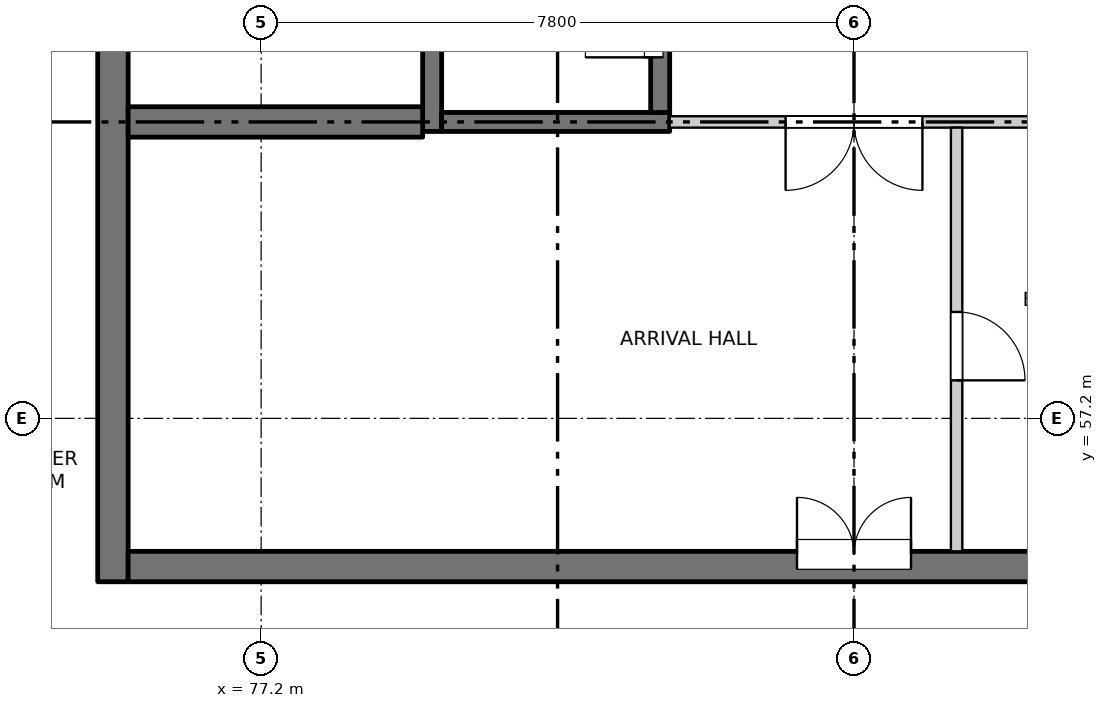
"""IFC4 building model, lengths in metres.
Left out: names, types, materials, properties, quantities, classifications, styles, units other than length and angle.
Written with IfcOpenShell. Run it as: python <this file> out.ifc"""

import sys

from ifc_helpers import new_model, si_unit, direction, frame, frame_2d, origin, place, context, subcontext, project, spatial, rectangle, extrude, element, fill, save


model = new_model("IFC4")
c1 = context("Model", 3, precision=1e-05, world=origin(), true_north=direction((0.0, 1.0)))
c2 = subcontext(c1, "Body", "Model", "MODEL_VIEW")
j1 = project(units=[si_unit("LENGTHUNIT", "METRE"), si_unit("PLANEANGLEUNIT", "RADIAN")], contexts=[c1])
p1 = place(None, origin())
s1 = spatial("IfcSite", under=j1, at=p1, CompositionType="ELEMENT")
p2 = place(p1, origin())
s2 = spatial("IfcBuilding", under=s1, at=p2, CompositionType="ELEMENT")
p3 = place(p2, frame((0.0, 0.0, 259.6)))
s3 = spatial("IfcBuildingStorey", under=s2, at=p3, CompositionType="ELEMENT", Elevation=259.6)
p4 = place(p3, frame((75.25, 55.05, -0.25), z_axis=(0.0, 0.0, 1.0), x_axis=(0.0, 1.0, 0.0)))
e1 = element("IfcWall", 1, at=p4, inside=s3, PredefinedType="SOLIDWALL", context=c2, shape_type="SweptSolid", body=[
    extrude(rectangle(XDim=22.25, YDim=0.4, at=frame_2d((11.125, 0.0))), origin(), (0.0, 0.0, 1.0), 3.4),
])
p5 = place(p4, frame((7.4, 0.0, 0.25)))
e2 = element("IfcOpeningElement", 2, at=p5, cuts=e1, PredefinedType="OPENING", context=c2, shape_type="SweptSolid", body=[
    extrude(rectangle(XDim=0.9, YDim=2.1, at=frame_2d((0.45, 1.05))), frame((0.0, 0.21, 0.0), z_axis=(0.0, -1.0, 0.0), x_axis=(1.0, 0.0, 0.0)), (0.0, 0.0, 1.0), 0.42),
])
p6 = place(p4, frame((10.7, 0.0, 0.25)))
e3 = element("IfcOpeningElement", 3, at=p6, cuts=e1, PredefinedType="OPENING", context=c2, shape_type="SweptSolid", body=[
    extrude(rectangle(XDim=0.9, YDim=2.1, at=frame_2d((0.45, 1.05))), frame((0.0, 0.21, 0.0), z_axis=(0.0, -1.0, 0.0), x_axis=(1.0, 0.0, 0.0)), (0.0, 0.0, 1.0), 0.42),
])
p7 = place(p4, frame((15.2, 0.0, 0.25)))
e4 = element("IfcOpeningElement", 4, at=p7, cuts=e1, PredefinedType="OPENING", context=c2, shape_type="SweptSolid", body=[
    extrude(rectangle(XDim=0.9, YDim=2.1, at=frame_2d((0.45, 1.05))), frame((0.0, 0.21, 0.0), z_axis=(0.0, -1.0, 0.0), x_axis=(1.0, 0.0, 0.0)), (0.0, 0.0, 1.0), 0.42),
])
p8 = place(p4, frame((20.0, 0.0, 0.25)))
e5 = element("IfcOpeningElement", 5, at=p8, cuts=e1, PredefinedType="OPENING", context=c2, shape_type="SweptSolid", body=[
    extrude(rectangle(XDim=0.9, YDim=2.1, at=frame_2d((0.45, 1.05))), frame((0.0, 0.21, 0.0), z_axis=(0.0, -1.0, 0.0), x_axis=(1.0, 0.0, 0.0)), (0.0, 0.0, 1.0), 0.42),
])
p9 = place(p3, frame((75.45, 55.25, -0.25), z_axis=(0.0, 0.0, 1.0), x_axis=(1.0, 0.0, 0.0)))
e6 = element("IfcWall", 6, at=p9, inside=s3, PredefinedType="SOLIDWALL", context=c2, shape_type="SweptSolid", body=[
    extrude(rectangle(XDim=19.1, YDim=0.4, at=frame_2d((9.55, 0.0))), origin(), (0.0, 0.0, 1.0), 3.4),
])
p10 = place(p9, frame((8.8, 0.0, 0.25)))
e7 = element("IfcOpeningElement", 7, at=p10, cuts=e6, PredefinedType="OPENING", context=c2, shape_type="SweptSolid", body=[
    extrude(rectangle(XDim=1.5, YDim=2.1, at=frame_2d((0.75, 1.05))), frame((0.0, 0.21, 0.0), z_axis=(0.0, -1.0, 0.0), x_axis=(1.0, 0.0, 0.0)), (0.0, 0.0, 1.0), 0.42),
])
p11 = place(p3, frame((79.45, 60.975, -0.25), z_axis=(0.0, 0.0, 1.0), x_axis=(0.0, 1.0, 0.0)))
e8 = element("IfcWall", 8, at=p11, inside=s3, PredefinedType="SOLIDWALL", context=c2, shape_type="SweptSolid", body=[
    extrude(rectangle(XDim=16.325, YDim=0.25, at=frame_2d((8.163, 0.0))), origin(), (0.0, 0.0, 1.0), 3.4),
])
p12 = place(p3, frame((79.575, 61.1, -0.25), z_axis=(0.0, 0.0, 1.0), x_axis=(1.0, 0.0, 0.0)))
e9 = element("IfcWall", 9, at=p12, inside=s3, PredefinedType="SOLIDWALL", context=c2, shape_type="SweptSolid", body=[
    extrude(rectangle(XDim=3.0, YDim=0.25, at=frame_2d((1.5, 0.0))), origin(), (0.0, 0.0, 1.0), 3.4),
])
p13 = place(p3, frame((82.45, 61.225, -0.25), z_axis=(0.0, 0.0, 1.0), x_axis=(0.0, 1.0, 0.0)))
e10 = element("IfcWall", 10, at=p13, inside=s3, PredefinedType="SOLIDWALL", context=c2, shape_type="SweptSolid", body=[
    extrude(rectangle(XDim=2.35, YDim=0.25, at=frame_2d((1.175, 0.0))), origin(), (0.0, 0.0, 1.0), 3.4),
])
p14 = place(p13, frame((0.725, 0.0, 0.25)))
e11 = element("IfcOpeningElement", 11, at=p14, cuts=e10, PredefinedType="OPENING", context=c2, shape_type="SweptSolid", body=[
    extrude(rectangle(XDim=0.9, YDim=2.1, at=frame_2d((0.45, 1.05))), frame((0.0, 0.135, 0.0), z_axis=(0.0, -1.0, 0.0), x_axis=(1.0, 0.0, 0.0)), (0.0, 0.0, 1.0), 0.27),
])
p15 = place(p3, frame((75.45, 61.1, -0.25), z_axis=(0.0, 0.0, 1.0), x_axis=(1.0, 0.0, 0.0)))
e12 = element("IfcWall", 12, at=p15, inside=s3, PredefinedType="SOLIDWALL", context=c2, shape_type="SweptSolid", body=[
    extrude(rectangle(XDim=3.875, YDim=0.4, at=frame_2d((1.938, 0.0))), origin(), (0.0, 0.0, 1.0), 3.4),
])
p16 = place(p3, frame((82.575, 61.1, 0.0), z_axis=(0.0, 0.0, 1.0), x_axis=(1.0, 0.0, 0.0)))
e13 = element("IfcWall", 13, at=p16, inside=s3, PredefinedType="PARTITIONING", context=c2, shape_type="SweptSolid", body=[
    extrude(rectangle(XDim=4.85, YDim=0.15, at=frame_2d((2.425, 0.0))), origin(), (0.0, 0.0, 1.0), 3.15),
])
p17 = place(p16, frame((1.525, 0.0, 0.0)))
e14 = element("IfcOpeningElement", 14, at=p17, cuts=e13, PredefinedType="OPENING", context=c2, shape_type="SweptSolid", body=[
    extrude(rectangle(XDim=1.8, YDim=2.1, at=frame_2d((0.9, 1.05))), frame((0.0, 0.085, 0.0), z_axis=(0.0, -1.0, 0.0), x_axis=(1.0, 0.0, 0.0)), (0.0, 0.0, 1.0), 0.17),
])
p18 = place(p3, frame((86.35, 55.45, 0.0), z_axis=(0.0, 0.0, 1.0), x_axis=(0.0, 1.0, 0.0)))
e15 = element("IfcWall", 15, at=p18, inside=s3, PredefinedType="PARTITIONING", context=c2, shape_type="SweptSolid", body=[
    extrude(rectangle(XDim=5.575, YDim=0.15, at=frame_2d((2.788, 0.0))), origin(), (0.0, 0.0, 1.0), 3.15),
])
p19 = place(p18, frame((2.25, 0.0, 0.0)))
e16 = element("IfcOpeningElement", 16, at=p19, cuts=e15, PredefinedType="OPENING", context=c2, shape_type="SweptSolid", body=[
    extrude(rectangle(XDim=0.9, YDim=2.1, at=frame_2d((0.45, 1.05))), frame((0.0, 0.085, 0.0), z_axis=(0.0, -1.0, 0.0), x_axis=(1.0, 0.0, 0.0)), (0.0, 0.0, 1.0), 0.17),
])
p20 = place(p10, origin())
e17 = element("IfcDoor", 17, at=p20, inside=s3, OperationType="DOUBLE_DOOR_SINGLE_SWING", PredefinedType="DOOR", context=c2, shape_type="SweptSolid", body=[
    extrude(rectangle(XDim=1.5, YDim=2.1, at=frame_2d((0.75, 1.05))), frame((0.0, 0.185, 0.0), z_axis=(0.0, -1.0, 0.0), x_axis=(1.0, 0.0, 0.0)), (0.0, 0.0, 1.0), 0.05),
])
fill(e7, e17)
p21 = place(p19, origin())
e18 = element("IfcDoor", 18, at=p21, inside=s3, OperationType="SINGLE_SWING_RIGHT", PredefinedType="DOOR", context=c2, shape_type="SweptSolid", body=[
    extrude(rectangle(XDim=0.9, YDim=2.1, at=frame_2d((0.45, 1.05))), frame((0.0, 0.025, 0.0), z_axis=(0.0, -1.0, 0.0), x_axis=(1.0, 0.0, 0.0)), (0.0, 0.0, 1.0), 0.05),
])
fill(e16, e18)
p22 = place(p17, origin())
e19 = element("IfcDoor", 19, at=p22, inside=s3, OperationType="DOUBLE_DOOR_SINGLE_SWING", PredefinedType="DOOR", context=c2, shape_type="SweptSolid", body=[
    extrude(rectangle(XDim=1.8, YDim=2.1, at=frame_2d((0.9, 1.05))), frame((0.0, 0.025, 0.0), z_axis=(0.0, -1.0, 0.0), x_axis=(1.0, 0.0, 0.0)), (0.0, 0.0, 1.0), 0.05),
])
fill(e14, e19)
p23 = place(p14, origin())
e20 = element("IfcDoor", 20, at=p23, inside=s3, OperationType="SINGLE_SWING_LEFT", PredefinedType="DOOR", context=c2, shape_type="SweptSolid", body=[
    extrude(rectangle(XDim=0.9, YDim=2.1, at=frame_2d((0.45, 1.05))), frame((0.0, 0.11, 0.0), z_axis=(0.0, -1.0, 0.0), x_axis=(1.0, 0.0, 0.0)), (0.0, 0.0, 1.0), 0.05),
])
fill(e11, e20)
save(model, sys.argv[1])
